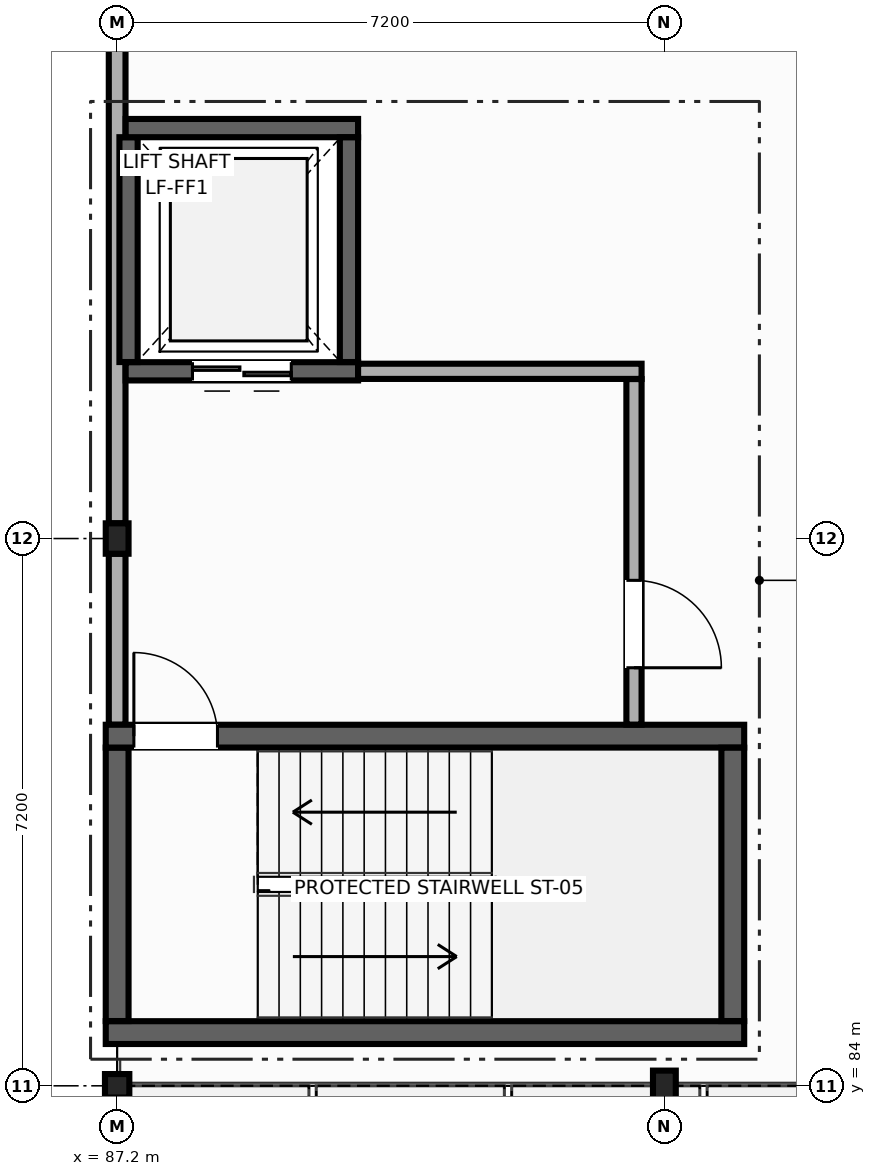
"""IFC4 building model, lengths in metres.
Left out: names, types, materials, properties, quantities, classifications, styles, units other than length and angle.
Written with IfcOpenShell. Run it as: python <this file> out.ifc"""

import sys

from ifc_helpers import new_model, si_unit, direction, frame, frame_2d, origin, origin_2d, place, context, subcontext, project, spatial, rectangle, i_section, extrude, element, fill, save


model = new_model("IFC4")
c1 = context("Model", 3, precision=1e-05, world=origin(), true_north=direction((0.0, 1.0)))
c2 = subcontext(c1, "Body", "Model", "MODEL_VIEW")
j1 = project(units=[si_unit("LENGTHUNIT", "METRE"), si_unit("PLANEANGLEUNIT", "RADIAN")], contexts=[c1])
p1 = place(None, origin())
s1 = spatial("IfcSite", under=j1, at=p1, CompositionType="ELEMENT")
p2 = place(p1, origin())
s2 = spatial("IfcBuilding", under=s1, at=p2, CompositionType="ELEMENT")
p3 = place(p2, frame((0.0, 0.0, 18.9)))
s3 = spatial("IfcBuildingStorey", under=s2, at=p3, CompositionType="ELEMENT", Elevation=18.9)
p4 = place(p3, frame((87.2, 84.0, 0.0), z_axis=(0.0, 0.0, 1.0), x_axis=(0.0, 1.0, 0.0)))
e1 = element("IfcColumn", 1, at=p4, inside=s3, PredefinedType="COLUMN", context=c2, shape_type="SweptSolid", body=[
    extrude(i_section(OverallWidth=0.309, OverallDepth=0.321, WebThickness=0.014, FlangeThickness=0.022, at=origin_2d()), origin(), (0.0, 0.0, 1.0), 4.2),
])
for number, where, z_axis, x_axis in (
    (2, (94.4, 84.0, 0.0), (0.0, 0.0, 1.0), (1.0, 0.0, 0.0)),
    (3, (87.2, 91.2, 0.0), (0.0, 0.0, 1.0), (1.0, 0.0, 0.0)),
):
    element("IfcColumn", number, at=place(p3, frame(where, z_axis=z_axis, x_axis=x_axis)), inside=s3, PredefinedType="COLUMN", context=c2, shape_type="SweptSolid", body=[
        extrude(i_section(OverallWidth=0.3, OverallDepth=0.4, WebThickness=0.013, FlangeThickness=0.024, at=origin_2d()), origin(), (0.0, 0.0, 1.0), 4.2),
    ])
p5 = place(p3, frame((87.2, 88.75, 0.0), z_axis=(0.0, 0.0, 1.0), x_axis=(0.0, 1.0, 0.0)))
e4 = element("IfcWall", 4, at=p5, inside=s3, PredefinedType="SOLIDWALL", context=c2, shape_type="SweptSolid", body=[
    extrude(rectangle(XDim=2.25, YDim=0.22, at=frame_2d((1.125, 0.0))), origin(), (0.0, 0.0, 1.0), 3.275),
])
p6 = place(p3, frame((87.2, 91.4, 0.0), z_axis=(0.0, 0.0, 1.0), x_axis=(0.0, 1.0, 0.0)))
e5 = element("IfcWall", 5, at=p6, inside=s3, PredefinedType="SOLIDWALL", context=c2, shape_type="SweptSolid", body=[
    extrude(rectangle(XDim=6.85, YDim=0.22, at=frame_2d((3.425, 0.0))), origin(), (0.0, 0.0, 1.0), 3.275),
])
p7 = place(p3, frame((95.45, 84.7, 0.0), z_axis=(0.0, 0.0, 1.0), x_axis=(-1.0, 0.0, 0.0)))
e6 = element("IfcWall", 6, at=p7, inside=s3, PredefinedType="SHEAR", context=c2, shape_type="SweptSolid", body=[
    extrude(rectangle(XDim=8.4, YDim=0.3, at=frame_2d((4.2, 0.0))), origin(), (0.0, 0.0, 1.0), 3.98),
])
p8 = place(p3, frame((87.2, 84.852, 0.0), z_axis=(0.0, 0.0, 1.0), x_axis=(0.0, 1.0, 0.0)))
e7 = element("IfcWall", 7, at=p8, inside=s3, PredefinedType="SHEAR", context=c2, shape_type="SweptSolid", body=[
    extrude(rectangle(XDim=3.598, YDim=0.3, at=frame_2d((1.799, 0.0))), origin(), (0.0, 0.0, 1.0), 3.98),
])
p9 = place(p3, frame((87.05, 88.6, 0.0), z_axis=(0.0, 0.0, 1.0), x_axis=(1.0, 0.0, 0.0)))
e8 = element("IfcWall", 8, at=p9, inside=s3, PredefinedType="SHEAR", context=c2, shape_type="SweptSolid", body=[
    extrude(rectangle(XDim=8.4, YDim=0.3, at=frame_2d((4.2, 0.0))), origin(), (0.0, 0.0, 1.0), 3.98),
])
p10 = place(p9, frame((0.37, 0.0, 0.0)))
e9 = element("IfcOpeningElement", 9, at=p10, cuts=e8, PredefinedType="OPENING", context=c2, shape_type="SweptSolid", body=[
    extrude(rectangle(XDim=1.1, YDim=2.15, at=frame_2d((0.55, 1.075))), frame((0.0, 0.16, 0.0), z_axis=(0.0, -1.0, 0.0), x_axis=(1.0, 0.0, 0.0)), (0.0, 0.0, 1.0), 0.32),
])
p11 = place(p3, frame((95.3, 88.448, 0.0), z_axis=(0.0, 0.0, 1.0), x_axis=(0.0, -1.0, 0.0)))
e10 = element("IfcWall", 10, at=p11, inside=s3, PredefinedType="SHEAR", context=c2, shape_type="SweptSolid", body=[
    extrude(rectangle(XDim=3.596, YDim=0.3, at=frame_2d((1.798, 0.0))), origin(), (0.0, 0.0, 1.0), 3.98),
])
p12 = place(p3, frame((90.37, 93.4, 0.0), z_axis=(0.0, 0.0, 1.0), x_axis=(-1.0, 0.0, 0.0)))
e11 = element("IfcWall", 11, at=p12, inside=s3, PredefinedType="SHEAR", context=c2, shape_type="SweptSolid", body=[
    extrude(rectangle(XDim=3.058, YDim=0.24, at=frame_2d((1.529, 0.0))), origin(), (0.0, 0.0, 1.0), 3.98),
])
p13 = place(p12, frame((0.879, 0.0, 0.0)))
e12 = element("IfcOpeningElement", 12, at=p13, cuts=e11, PredefinedType="OPENING", context=c2, shape_type="SweptSolid", body=[
    extrude(rectangle(XDim=1.3, YDim=2.15, at=frame_2d((0.65, 1.075))), frame((0.0, 0.13, 0.0), z_axis=(0.0, -1.0, 0.0), x_axis=(1.0, 0.0, 0.0)), (0.0, 0.0, 1.0), 0.26),
])
p14 = place(p3, frame((87.35, 93.522, 0.0), z_axis=(0.0, 0.0, 1.0), x_axis=(0.0, 1.0, 0.0)))
e13 = element("IfcWall", 13, at=p14, inside=s3, PredefinedType="SHEAR", context=c2, shape_type="SweptSolid", body=[
    extrude(rectangle(XDim=2.958, YDim=0.24, at=frame_2d((1.479, 0.0))), origin(), (0.0, 0.0, 1.0), 3.98),
])
p15 = place(p3, frame((87.312, 96.6, 0.0), z_axis=(0.0, 0.0, 1.0), x_axis=(1.0, 0.0, 0.0)))
e14 = element("IfcWall", 14, at=p15, inside=s3, PredefinedType="SHEAR", context=c2, shape_type="SweptSolid", body=[
    extrude(rectangle(XDim=3.058, YDim=0.24, at=frame_2d((1.529, 0.0))), origin(), (0.0, 0.0, 1.0), 3.98),
])
p16 = place(p3, frame((90.25, 96.478, 0.0), z_axis=(0.0, 0.0, 1.0), x_axis=(0.0, -1.0, 0.0)))
e15 = element("IfcWall", 15, at=p16, inside=s3, PredefinedType="SHEAR", context=c2, shape_type="SweptSolid", body=[
    extrude(rectangle(XDim=2.956, YDim=0.24, at=frame_2d((1.478, 0.0))), origin(), (0.0, 0.0, 1.0), 3.98),
])
p17 = place(p3, frame((90.37, 93.4, 0.0), z_axis=(0.0, 0.0, 1.0), x_axis=(1.0, 0.0, 0.0)))
e16 = element("IfcWall", 16, at=p17, inside=s3, PredefinedType="PARTITIONING", context=c2, shape_type="SweptSolid", body=[
    extrude(rectangle(XDim=3.73, YDim=0.2, at=frame_2d((1.865, 0.0))), origin(), (0.0, 0.0, 1.0), 3.98),
])
p18 = place(p3, frame((94.0, 93.298, 0.0), z_axis=(0.0, 0.0, 1.0), x_axis=(0.0, -1.0, 0.0)))
e17 = element("IfcWall", 17, at=p18, inside=s3, PredefinedType="PARTITIONING", context=c2, shape_type="SweptSolid", body=[
    extrude(rectangle(XDim=4.546, YDim=0.2, at=frame_2d((2.273, 0.0))), origin(), (0.0, 0.0, 1.0), 3.98),
])
p19 = place(p18, frame((2.648, 0.0, 0.0)))
e18 = element("IfcOpeningElement", 18, at=p19, cuts=e17, PredefinedType="OPENING", context=c2, shape_type="SweptSolid", body=[
    extrude(rectangle(XDim=1.15, YDim=2.15, at=frame_2d((0.575, 1.075))), frame((0.0, 0.11, 0.0), z_axis=(0.0, -1.0, 0.0), x_axis=(1.0, 0.0, 0.0)), (0.0, 0.0, 1.0), 0.22),
])
p20 = place(p2, frame((0.0, 0.0, 14.4)))
s4 = spatial("IfcBuildingStorey", under=s2, at=p20, CompositionType="ELEMENT", Elevation=14.4)
p21 = place(p20, frame((94.55, 84.0, 0.0), z_axis=(0.0, 0.0, 1.0), x_axis=(1.0, 0.0, 0.0)))
e19 = element("IfcWall", 19, at=p21, inside=s4, PredefinedType="SHEAR", context=c2, shape_type="SweptSolid", body=[
    extrude(rectangle(XDim=6.85, YDim=0.4, at=frame_2d((3.425, 0.0))), origin(), (0.0, 0.0, 1.0), 9.318),
])
p22 = place(p10, origin())
e20 = element("IfcDoor", 20, at=p22, inside=s3, OperationType="SINGLE_SWING_LEFT", PredefinedType="DOOR", context=c2, shape_type="SweptSolid", body=[
    extrude(rectangle(XDim=1.1, YDim=2.15, at=frame_2d((0.55, 1.075))), frame((0.0, 0.025, 0.0), z_axis=(0.0, -1.0, 0.0), x_axis=(1.0, 0.0, 0.0)), (0.0, 0.0, 1.0), 0.05),
])
fill(e9, e20)
p23 = place(p13, origin())
e21 = element("IfcDoor", 21, at=p23, inside=s3, OperationType="DOUBLE_DOOR_SLIDING", PredefinedType="DOOR", context=c2, shape_type="SweptSolid", body=[
    extrude(rectangle(XDim=1.3, YDim=2.15, at=frame_2d((0.65, 1.075))), frame((0.0, 0.025, 0.0), z_axis=(0.0, -1.0, 0.0), x_axis=(1.0, 0.0, 0.0)), (0.0, 0.0, 1.0), 0.05),
])
fill(e12, e21)
p24 = place(p19, origin())
e22 = element("IfcDoor", 22, at=p24, inside=s3, OperationType="SINGLE_SWING_RIGHT", PredefinedType="DOOR", context=c2, shape_type="SweptSolid", body=[
    extrude(rectangle(XDim=1.15, YDim=2.15, at=frame_2d((0.575, 1.075))), frame((0.0, 0.025, 0.0), z_axis=(0.0, -1.0, 0.0), x_axis=(1.0, 0.0, 0.0)), (0.0, 0.0, 1.0), 0.05),
])
fill(e18, e22)
save(model, sys.argv[1])
